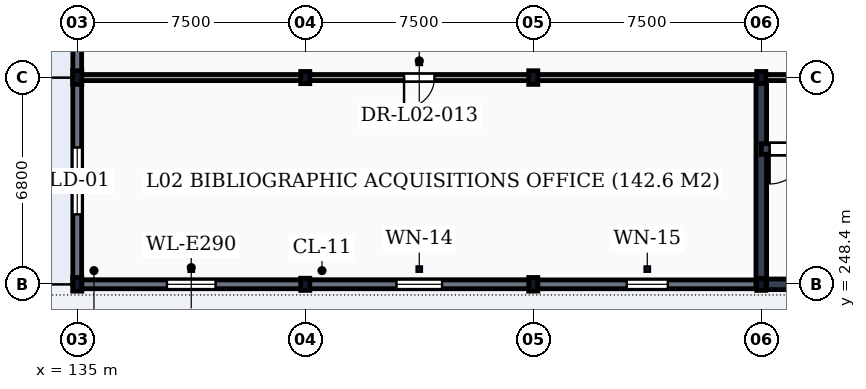
"""IFC4 building model, lengths in metres.
Left out: names, types, materials, properties, quantities, classifications, styles, units other than length and angle.
Written with IfcOpenShell. Run it as: python <this file> out.ifc"""

import sys

from ifc_helpers import new_model, si_unit, direction, frame, frame_2d, origin, origin_2d, place, context, subcontext, project, spatial, rectangle, i_section, extrude, element, fill, save


model = new_model("IFC4")
c1 = context("Model", 3, precision=1e-05, world=origin(), true_north=direction((0.0, 1.0)))
c2 = subcontext(c1, "Body", "Model", "MODEL_VIEW")
j1 = project(units=[si_unit("LENGTHUNIT", "METRE"), si_unit("PLANEANGLEUNIT", "RADIAN")], contexts=[c1])
p1 = place(None, origin())
s1 = spatial("IfcSite", under=j1, at=p1, CompositionType="ELEMENT")
p2 = place(p1, origin())
s2 = spatial("IfcBuilding", under=s1, at=p2, CompositionType="ELEMENT")
p3 = place(p2, frame((0.0, 0.0, 5.4)))
s3 = spatial("IfcBuildingStorey", under=s2, at=p3, CompositionType="ELEMENT", Elevation=5.4)
for number, where, z_axis, x_axis in (
    (1, (135.0, 248.4, 0.0), (0.0, 0.0, 1.0), (1.0, 0.0, 0.0)),
    (2, (135.0, 255.2, 0.0), (0.0, 0.0, 1.0), (1.0, 0.0, 0.0)),
):
    element("IfcColumn", number, at=place(p3, frame(where, z_axis=z_axis, x_axis=x_axis)), inside=s3, PredefinedType="COLUMN", context=c2, shape_type="SweptSolid", body=[
        extrude(i_section(OverallWidth=0.3, OverallDepth=0.45, WebThickness=0.014, FlangeThickness=0.026, FilletRadius=0.027, at=origin_2d()), origin(), (0.0, 0.0, 1.0), 5.1),
    ])
for number, where, z_axis, x_axis in (
    (3, (142.5, 248.4, 0.0), (0.0, 0.0, 1.0), (1.0, 0.0, 0.0)),
    (4, (142.5, 255.2, 0.0), (0.0, 0.0, 1.0), (1.0, 0.0, 0.0)),
):
    element("IfcColumn", number, at=place(p3, frame(where, z_axis=z_axis, x_axis=x_axis)), inside=s3, PredefinedType="COLUMN", context=c2, shape_type="SweptSolid", body=[
        extrude(i_section(OverallWidth=0.3, OverallDepth=0.4, WebThickness=0.013, FlangeThickness=0.024, FilletRadius=0.027, at=origin_2d()), origin(), (0.0, 0.0, 1.0), 5.1),
    ])
for number, where, z_axis, x_axis in (
    (5, (150.0, 248.4, 0.0), (0.0, 0.0, 1.0), (1.0, 0.0, 0.0)),
    (6, (150.0, 255.2, 0.0), (0.0, 0.0, 1.0), (1.0, 0.0, 0.0)),
):
    element("IfcColumn", number, at=place(p3, frame(where, z_axis=z_axis, x_axis=x_axis)), inside=s3, PredefinedType="COLUMN", context=c2, shape_type="SweptSolid", body=[
        extrude(i_section(OverallWidth=0.3, OverallDepth=0.45, WebThickness=0.014, FlangeThickness=0.026, FilletRadius=0.027, at=origin_2d()), origin(), (0.0, 0.0, 1.0), 5.1),
    ])
for number, where, z_axis, x_axis in (
    (7, (157.5, 248.4, 0.0), (0.0, 0.0, 1.0), (1.0, 0.0, 0.0)),
    (8, (157.5, 255.2, 0.0), (0.0, 0.0, 1.0), (1.0, 0.0, 0.0)),
):
    element("IfcColumn", number, at=place(p3, frame(where, z_axis=z_axis, x_axis=x_axis)), inside=s3, PredefinedType="COLUMN", context=c2, shape_type="SweptSolid", body=[
        extrude(i_section(OverallWidth=0.3, OverallDepth=0.4, WebThickness=0.013, FlangeThickness=0.024, FilletRadius=0.027, at=origin_2d()), origin(), (0.0, 0.0, 1.0), 5.1),
    ])
p4 = place(p3, frame((135.006, 248.4, 0.0), z_axis=(0.0, 0.0, 1.0), x_axis=(1.0, 0.0, 0.0)))
e9 = element("IfcWall", 9, at=p4, inside=s3, PredefinedType="SOLIDWALL", context=c2, shape_type="SweptSolid", body=[
    extrude(rectangle(XDim=7.488, YDim=0.29, at=frame_2d((3.744, 0.0))), origin(), (0.0, 0.0, 1.0), 4.578),
])
p5 = place(p4, frame((2.944, 0.0, 0.95)))
e10 = element("IfcOpeningElement", 10, at=p5, cuts=e9, PredefinedType="OPENING", context=c2, shape_type="SweptSolid", body=[
    extrude(rectangle(XDim=1.6, YDim=2.0, at=frame_2d((0.8, 1.0))), frame((0.0, 0.16, 0.0), z_axis=(0.0, -1.0, 0.0), x_axis=(1.0, 0.0, 0.0)), (0.0, 0.0, 1.0), 0.32),
])
p6 = place(p3, frame((142.506, 248.4, 0.0), z_axis=(0.0, 0.0, 1.0), x_axis=(1.0, 0.0, 0.0)))
e11 = element("IfcWall", 11, at=p6, inside=s3, PredefinedType="SOLIDWALL", context=c2, shape_type="SweptSolid", body=[
    extrude(rectangle(XDim=7.488, YDim=0.29, at=frame_2d((3.744, 0.0))), origin(), (0.0, 0.0, 1.0), 4.578),
])
p7 = place(p6, frame((2.994, 0.0, 0.95)))
e12 = element("IfcOpeningElement", 12, at=p7, cuts=e11, PredefinedType="OPENING", context=c2, shape_type="SweptSolid", body=[
    extrude(rectangle(XDim=1.5, YDim=1.9, at=frame_2d((0.75, 0.95))), frame((0.0, 0.16, 0.0), z_axis=(0.0, -1.0, 0.0), x_axis=(1.0, 0.0, 0.0)), (0.0, 0.0, 1.0), 0.32),
])
p8 = place(p3, frame((150.006, 248.4, 0.0), z_axis=(0.0, 0.0, 1.0), x_axis=(1.0, 0.0, 0.0)))
e13 = element("IfcWall", 13, at=p8, inside=s3, PredefinedType="SOLIDWALL", context=c2, shape_type="SweptSolid", body=[
    extrude(rectangle(XDim=7.488, YDim=0.29, at=frame_2d((3.744, 0.0))), origin(), (0.0, 0.0, 1.0), 4.578),
])
p9 = place(p8, frame((3.069, 0.0, 0.95)))
e14 = element("IfcOpeningElement", 14, at=p9, cuts=e13, PredefinedType="OPENING", context=c2, shape_type="SweptSolid", body=[
    extrude(rectangle(XDim=1.35, YDim=1.8, at=frame_2d((0.675, 0.9))), frame((0.0, 0.16, 0.0), z_axis=(0.0, -1.0, 0.0), x_axis=(1.0, 0.0, 0.0)), (0.0, 0.0, 1.0), 0.32),
])
p10 = place(p3, frame((135.0, 248.406, 0.0), z_axis=(0.0, 0.0, 1.0), x_axis=(0.0, 1.0, 0.0)))
e15 = element("IfcWall", 15, at=p10, inside=s3, PredefinedType="SOLIDWALL", context=c2, shape_type="SweptSolid", body=[
    extrude(rectangle(XDim=6.788, YDim=0.29, at=frame_2d((3.394, 0.0))), origin(), (0.0, 0.0, 1.0), 4.618),
])
p11 = place(p10, frame((2.294, 0.0, 0.95)))
e16 = element("IfcOpeningElement", 16, at=p11, cuts=e15, PredefinedType="OPENING", context=c2, shape_type="SweptSolid", body=[
    extrude(rectangle(XDim=2.2, YDim=2.8, at=frame_2d((1.1, 1.4))), frame((0.0, 0.16, 0.0), z_axis=(0.0, -1.0, 0.0), x_axis=(1.0, 0.0, 0.0)), (0.0, 0.0, 1.0), 0.32),
])
p12 = place(p3, frame((135.0, 255.206, 0.0), z_axis=(0.0, 0.0, 1.0), x_axis=(0.0, 1.0, 0.0)))
e17 = element("IfcWall", 17, at=p12, inside=s3, PredefinedType="SOLIDWALL", context=c2, shape_type="SweptSolid", body=[
    extrude(rectangle(XDim=7.588, YDim=0.29, at=frame_2d((3.794, 0.0))), origin(), (0.0, 0.0, 1.0), 4.578),
])
p13 = place(p12, frame((4.066, 0.0, 0.95)))
e18 = element("IfcOpeningElement", 18, at=p13, cuts=e17, PredefinedType="OPENING", context=c2, shape_type="SweptSolid", body=[
    extrude(rectangle(XDim=2.0, YDim=2.6, at=frame_2d((1.0, 1.3))), frame((0.0, 0.16, 0.0), z_axis=(0.0, -1.0, 0.0), x_axis=(1.0, 0.0, 0.0)), (0.0, 0.0, 1.0), 0.32),
])
p14 = place(p3, frame((135.1, 248.5, 5.1), z_axis=(0.0, 0.0, 1.0), x_axis=(1.0, 0.0, 0.0)))
e19 = element("IfcWall", 19, at=p14, inside=s3, PredefinedType="PARAPET", context=c2, shape_type="SweptSolid", body=[
    extrude(rectangle(XDim=14.8, YDim=0.18, at=frame_2d((7.4, 0.0))), origin(), (0.0, 0.0, 1.0), 1.2),
])
p15 = place(p3, frame((135.1, 248.6, 5.1), z_axis=(0.0, 0.0, 1.0), x_axis=(0.0, 1.0, 0.0)))
e20 = element("IfcWall", 20, at=p15, inside=s3, PredefinedType="PARAPET", context=c2, shape_type="SweptSolid", body=[
    extrude(rectangle(XDim=89.2, YDim=0.18, at=frame_2d((44.6, 0.0))), origin(), (0.0, 0.0, 1.0), 1.2),
])
p16 = place(p3, frame((157.5, 248.4, 0.0), z_axis=(0.0, 0.0, 1.0), x_axis=(1.0, 0.0, 0.0)))
e21 = element("IfcWall", 21, at=p16, inside=s3, PredefinedType="SHEAR", context=c2, shape_type="SweptSolid", body=[
    extrude(rectangle(XDim=7.5, YDim=0.35, at=frame_2d((3.75, 0.0))), origin(), (0.0, 0.0, 1.0), 4.86),
])
p17 = place(p3, frame((157.5, 248.4, 0.0), z_axis=(0.0, 0.0, 1.0), x_axis=(0.0, 1.0, 0.0)))
e22 = element("IfcWall", 22, at=p17, inside=s3, PredefinedType="SHEAR", context=c2, shape_type="SweptSolid", body=[
    extrude(rectangle(XDim=6.8, YDim=0.35, at=frame_2d((3.4, 0.0))), origin(), (0.0, 0.0, 1.0), 4.86),
])
p18 = place(p3, frame((157.5, 252.85, 0.0), z_axis=(0.0, 0.0, 1.0), x_axis=(1.0, 0.0, 0.0)))
e23 = element("IfcWall", 23, at=p18, inside=s3, PredefinedType="SHEAR", context=c2, shape_type="SweptSolid", body=[
    extrude(rectangle(XDim=7.5, YDim=0.35, at=frame_2d((3.75, 0.0))), origin(), (0.0, 0.0, 1.0), 4.86),
])
p19 = place(p18, frame((0.275, 0.0, 0.0)))
e24 = element("IfcOpeningElement", 24, at=p19, cuts=e23, PredefinedType="OPENING", context=c2, shape_type="SweptSolid", body=[
    extrude(rectangle(XDim=1.15, YDim=2.15, at=frame_2d((0.575, 1.075))), frame((0.0, 0.19, 0.0), z_axis=(0.0, -1.0, 0.0), x_axis=(1.0, 0.0, 0.0)), (0.0, 0.0, 1.0), 0.38),
])
p20 = place(p3, frame((157.5, 255.2, 0.0), z_axis=(0.0, 0.0, 1.0), x_axis=(1.0, 0.0, 0.0)))
e25 = element("IfcWall", 25, at=p20, inside=s3, PredefinedType="PARTITIONING", context=c2, shape_type="SweptSolid", body=[
    extrude(rectangle(XDim=7.5, YDim=0.2, at=frame_2d((3.75, 0.0))), origin(), (0.0, 0.0, 1.0), 4.498),
])
p21 = place(p20, frame((3.025, 0.0, 0.0)))
e26 = element("IfcOpeningElement", 26, at=p21, cuts=e25, PredefinedType="OPENING", context=c2, shape_type="SweptSolid", body=[
    extrude(rectangle(XDim=1.45, YDim=2.2, at=frame_2d((0.725, 1.1))), frame((0.0, 0.115, 0.0), z_axis=(0.0, -1.0, 0.0), x_axis=(1.0, 0.0, 0.0)), (0.0, 0.0, 1.0), 0.23),
])
p22 = place(p3, frame((135.0, 255.2, 0.0), z_axis=(0.0, 0.0, 1.0), x_axis=(1.0, 0.0, 0.0)))
e27 = element("IfcWall", 27, at=p22, inside=s3, PredefinedType="PARTITIONING", context=c2, shape_type="SweptSolid", body=[
    extrude(rectangle(XDim=22.5, YDim=0.2, at=frame_2d((11.25, 0.0))), origin(), (0.0, 0.0, 1.0), 4.488),
])
p23 = place(p22, frame((10.75, 0.0, 0.0)))
e28 = element("IfcOpeningElement", 28, at=p23, cuts=e27, PredefinedType="OPENING", context=c2, shape_type="SweptSolid", body=[
    extrude(rectangle(XDim=1.0, YDim=2.1, at=frame_2d((0.5, 1.05))), frame((0.0, 0.115, 0.0), z_axis=(0.0, -1.0, 0.0), x_axis=(1.0, 0.0, 0.0)), (0.0, 0.0, 1.0), 0.23),
])
p24 = place(p5, origin())
e29 = element("IfcWindow", 29, at=p24, inside=s3, PartitioningType="SINGLE_PANEL", PredefinedType="WINDOW", context=c2, shape_type="SweptSolid", body=[
    extrude(rectangle(XDim=1.6, YDim=2.0, at=frame_2d((0.8, 1.0))), frame((0.0, 0.03, 0.0), z_axis=(0.0, -1.0, 0.0), x_axis=(1.0, 0.0, 0.0)), (0.0, 0.0, 1.0), 0.06),
])
fill(e10, e29)
p25 = place(p7, origin())
e30 = element("IfcWindow", 30, at=p25, inside=s3, PartitioningType="SINGLE_PANEL", PredefinedType="WINDOW", context=c2, shape_type="SweptSolid", body=[
    extrude(rectangle(XDim=1.5, YDim=1.9, at=frame_2d((0.75, 0.95))), frame((0.0, 0.03, 0.0), z_axis=(0.0, -1.0, 0.0), x_axis=(1.0, 0.0, 0.0)), (0.0, 0.0, 1.0), 0.06),
])
fill(e12, e30)
p26 = place(p9, origin())
e31 = element("IfcWindow", 31, at=p26, inside=s3, PartitioningType="SINGLE_PANEL", PredefinedType="WINDOW", context=c2, shape_type="SweptSolid", body=[
    extrude(rectangle(XDim=1.35, YDim=1.8, at=frame_2d((0.675, 0.9))), frame((0.0, 0.03, 0.0), z_axis=(0.0, -1.0, 0.0), x_axis=(1.0, 0.0, 0.0)), (0.0, 0.0, 1.0), 0.06),
])
fill(e14, e31)
p27 = place(p11, origin())
e32 = element("IfcWindow", 32, at=p27, inside=s3, PartitioningType="DOUBLE_PANEL_VERTICAL", PredefinedType="WINDOW", context=c2, shape_type="SweptSolid", body=[
    extrude(rectangle(XDim=2.2, YDim=2.8, at=frame_2d((1.1, 1.4))), frame((0.0, 0.03, 0.0), z_axis=(0.0, -1.0, 0.0), x_axis=(1.0, 0.0, 0.0)), (0.0, 0.0, 1.0), 0.06),
])
fill(e16, e32)
p28 = place(p19, frame((1.15, 0.0, 0.0), z_axis=(0.0, 0.0, 1.0), x_axis=(-1.0, 0.0, 0.0)))
e33 = element("IfcDoor", 33, at=p28, inside=s3, OperationType="SINGLE_SWING_RIGHT", PredefinedType="DOOR", context=c2, shape_type="SweptSolid", body=[
    extrude(rectangle(XDim=1.15, YDim=2.15, at=frame_2d((0.575, 1.075))), frame((0.0, 0.025, 0.0), z_axis=(0.0, -1.0, 0.0), x_axis=(1.0, 0.0, 0.0)), (0.0, 0.0, 1.0), 0.05),
])
fill(e24, e33)
p29 = place(p23, frame((1.0, 0.0, 0.0), z_axis=(0.0, 0.0, 1.0), x_axis=(-1.0, 0.0, 0.0)))
e34 = element("IfcDoor", 34, at=p29, inside=s3, OperationType="SINGLE_SWING_RIGHT", PredefinedType="DOOR", context=c2, shape_type="SweptSolid", body=[
    extrude(rectangle(XDim=1.0, YDim=2.1, at=frame_2d((0.5, 1.05))), frame((0.0, 0.025, 0.0), z_axis=(0.0, -1.0, 0.0), x_axis=(1.0, 0.0, 0.0)), (0.0, 0.0, 1.0), 0.05),
])
fill(e28, e34)
save(model, sys.argv[1])
